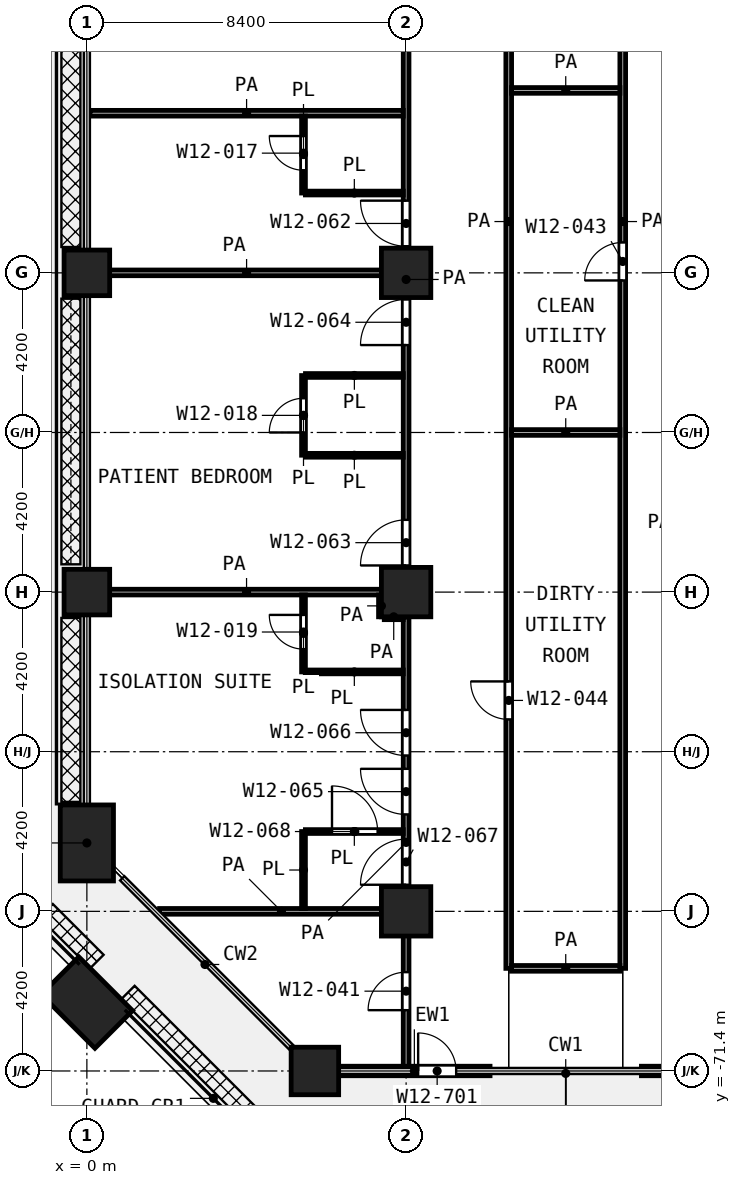
"""IFC4 building model, lengths in metres.
Left out: names, types, materials, properties, quantities, classifications, styles, units other than length and angle.
Written with IfcOpenShell. Run it as: python <this file> out.ifc"""

import sys

from ifc_helpers import new_model, si_unit, direction, frame, frame_2d, origin, origin_2d, place, context, subcontext, project, spatial, rectangle, extrude, element, fill, save


model = new_model("IFC4")
c1 = context("Model", 3, precision=1e-05, world=origin(), true_north=direction((0.0, 1.0)))
c2 = subcontext(c1, "Body", "Model", "MODEL_VIEW")
j1 = project(units=[si_unit("LENGTHUNIT", "METRE"), si_unit("PLANEANGLEUNIT", "RADIAN")], contexts=[c1])
p1 = place(None, origin())
s1 = spatial("IfcSite", under=j1, at=p1, CompositionType="ELEMENT")
p2 = place(p1, origin())
s2 = spatial("IfcBuilding", under=s1, at=p2, CompositionType="ELEMENT")
p3 = place(p2, frame((0.0, 0.0, 56.0)))
s3 = spatial("IfcBuildingStorey", under=s2, at=p3, CompositionType="ELEMENT", Elevation=56.0)
p4 = place(p3, frame((0.0, -50.4, 0.0), z_axis=(0.0, 0.0, 1.0), x_axis=(1.0, 0.0, 0.0)))
e1 = element("IfcColumn", 1, at=p4, inside=s3, PredefinedType="COLUMN", context=c2, shape_type="SweptSolid", body=[
    extrude(rectangle(XDim=1.2, YDim=1.2, at=origin_2d()), origin(), (0.0, 0.0, 1.0), 4.2),
])
p5 = place(p3, frame((8.4, -50.4, 0.0), z_axis=(0.0, 0.0, 1.0), x_axis=(1.0, 0.0, 0.0)))
e2 = element("IfcColumn", 2, at=p5, inside=s3, PredefinedType="COLUMN", context=c2, shape_type="SweptSolid", body=[
    extrude(rectangle(XDim=1.3, YDim=1.3, at=origin_2d()), origin(), (0.0, 0.0, 1.0), 4.2),
])
p6 = place(p3, frame((0.0, -58.8, 0.0), z_axis=(0.0, 0.0, 1.0), x_axis=(1.0, 0.0, 0.0)))
e3 = element("IfcColumn", 3, at=p6, inside=s3, PredefinedType="COLUMN", context=c2, shape_type="SweptSolid", body=[
    extrude(rectangle(XDim=1.2, YDim=1.2, at=origin_2d()), origin(), (0.0, 0.0, 1.0), 4.2),
])
p7 = place(p3, frame((8.4, -58.8, 0.0), z_axis=(0.0, 0.0, 1.0), x_axis=(1.0, 0.0, 0.0)))
e4 = element("IfcColumn", 4, at=p7, inside=s3, PredefinedType="COLUMN", context=c2, shape_type="SweptSolid", body=[
    extrude(rectangle(XDim=1.3, YDim=1.3, at=origin_2d()), origin(), (0.0, 0.0, 1.0), 4.2),
])
p8 = place(p3, frame((0.0, -65.4, 0.0), z_axis=(0.0, 0.0, 1.0), x_axis=(0.0, 1.0, 0.0)))
e5 = element("IfcColumn", 5, at=p8, inside=s3, PredefinedType="COLUMN", context=c2, shape_type="SweptSolid", body=[
    extrude(rectangle(XDim=2.0, YDim=1.4, at=origin_2d()), origin(), (0.0, 0.0, 1.0), 4.2),
])
p9 = place(p3, frame((8.4, -67.2, 0.0), z_axis=(0.0, 0.0, 1.0), x_axis=(1.0, 0.0, 0.0)))
e6 = element("IfcColumn", 6, at=p9, inside=s3, PredefinedType="COLUMN", context=c2, shape_type="SweptSolid", body=[
    extrude(rectangle(XDim=1.3, YDim=1.3, at=origin_2d()), origin(), (0.0, 0.0, 1.0), 4.2),
])
p10 = place(p3, frame((6.0, -71.4, 0.0), z_axis=(0.0, 0.0, 1.0), x_axis=(1.0, 0.0, 0.0)))
e7 = element("IfcColumn", 7, at=p10, inside=s3, PredefinedType="COLUMN", context=c2, shape_type="SweptSolid", body=[
    extrude(rectangle(XDim=1.25, YDim=1.25, at=origin_2d()), origin(), (0.0, 0.0, 1.0), 4.2),
])
p11 = place(p3, frame((0.0, -69.6, 0.0), z_axis=(0.0, 0.0, 1.0), x_axis=(-0.707106781187, 0.707106781187, 0.0)))
e8 = element("IfcColumn", 8, at=p11, inside=s3, PredefinedType="COLUMN", context=c2, shape_type="SweptSolid", body=[
    extrude(rectangle(XDim=2.0, YDim=1.4, at=origin_2d()), origin(), (0.0, 0.0, 1.0), 4.2),
])
p12 = place(p3, frame((6.625, -71.4, 0.0), z_axis=(0.0, 0.0, 1.0), x_axis=(1.0, 0.0, 0.0)))
e9 = element("IfcWall", 9, at=p12, inside=s3, PredefinedType="SOLIDWALL", context=c2, shape_type="SweptSolid", body=[
    extrude(rectangle(XDim=3.983, YDim=0.25, at=frame_2d((1.992, 0.0))), origin(), (0.0, 0.0, 1.0), 3.78),
])
p13 = place(p12, frame((2.092, 0.0, 0.0)))
e10 = element("IfcOpeningElement", 10, at=p13, cuts=e9, PredefinedType="OPENING", context=c2, shape_type="SweptSolid", body=[
    extrude(rectangle(XDim=1.0, YDim=2.1, at=frame_2d((0.5, 1.05))), frame((0.0, 0.135, 0.0), z_axis=(0.0, -1.0, 0.0), x_axis=(1.0, 0.0, 0.0)), (0.0, 0.0, 1.0), 0.27),
])
p14 = place(p3, frame((14.592, -71.4, 0.0), z_axis=(0.0, 0.0, 1.0), x_axis=(1.0, 0.0, 0.0)))
e11 = element("IfcWall", 11, at=p14, inside=s3, PredefinedType="SOLIDWALL", context=c2, shape_type="SweptSolid", body=[
    extrude(rectangle(XDim=3.983, YDim=0.25, at=frame_2d((1.992, 0.0))), origin(), (0.0, 0.0, 1.0), 3.78),
])
p15 = place(p14, frame((0.892, 0.0, 0.0)))
e12 = element("IfcOpeningElement", 12, at=p15, cuts=e11, PredefinedType="OPENING", context=c2, shape_type="SweptSolid", body=[
    extrude(rectangle(XDim=1.0, YDim=2.1, at=frame_2d((0.5, 1.05))), frame((0.0, 0.135, 0.0), z_axis=(0.0, -1.0, 0.0), x_axis=(1.0, 0.0, 0.0)), (0.0, 0.0, 1.0), 0.27),
])
p16 = place(p3, frame((5.75, -65.1, 0.0), z_axis=(0.0, 0.0, 1.0), x_axis=(1.0, 0.0, 0.0)))
e13 = element("IfcWall", 13, at=p16, inside=s3, PredefinedType="PARTITIONING", context=c2, shape_type="SweptSolid", body=[
    extrude(rectangle(XDim=2.575, YDim=0.1, at=frame_2d((1.288, 0.0))), origin(), (0.0, 0.0, 1.0), 3.9),
])
p17 = place(p16, frame((0.7, 0.0, 0.0)))
e14 = element("IfcOpeningElement", 14, at=p17, cuts=e13, PredefinedType="OPENING", context=c2, shape_type="SweptSolid", body=[
    extrude(rectangle(XDim=1.2, YDim=2.1, at=frame_2d((0.6, 1.05))), frame((0.0, 0.06, 0.0), z_axis=(0.0, -1.0, 0.0), x_axis=(1.0, 0.0, 0.0)), (0.0, 0.0, 1.0), 0.12),
])
p18 = place(p3, frame((5.75, -60.9, 0.0), z_axis=(0.0, 0.0, 1.0), x_axis=(1.0, 0.0, 0.0)))
e15 = element("IfcWall", 15, at=p18, inside=s3, PredefinedType="PARTITIONING", context=c2, shape_type="SweptSolid", body=[
    extrude(rectangle(XDim=2.575, YDim=0.1, at=frame_2d((1.288, 0.0))), origin(), (0.0, 0.0, 1.0), 3.9),
])
p19 = place(p3, frame((5.751, -55.2, 0.0), z_axis=(0.0, 0.0, 1.0), x_axis=(1.0, 0.0, 0.0)))
e16 = element("IfcWall", 16, at=p19, inside=s3, PredefinedType="PARTITIONING", context=c2, shape_type="SweptSolid", body=[
    extrude(rectangle(XDim=2.574, YDim=0.1, at=frame_2d((1.287, 0.0))), origin(), (0.0, 0.0, 1.0), 3.9),
])
p20 = place(p3, frame((5.752, -53.1, 0.0), z_axis=(0.0, 0.0, 1.0), x_axis=(1.0, 0.0, 0.0)))
e17 = element("IfcWall", 17, at=p20, inside=s3, PredefinedType="PARTITIONING", context=c2, shape_type="SweptSolid", body=[
    extrude(rectangle(XDim=2.573, YDim=0.1, at=frame_2d((1.287, 0.0))), origin(), (0.0, 0.0, 1.0), 3.9),
])
p21 = place(p3, frame((5.75, -48.3, 0.0), z_axis=(0.0, 0.0, 1.0), x_axis=(1.0, 0.0, 0.0)))
e18 = element("IfcWall", 18, at=p21, inside=s3, PredefinedType="PARTITIONING", context=c2, shape_type="SweptSolid", body=[
    extrude(rectangle(XDim=2.575, YDim=0.1, at=frame_2d((1.288, 0.0))), origin(), (0.0, 0.0, 1.0), 3.9),
])
p22 = place(p3, frame((5.7, -67.125, 0.0), z_axis=(0.0, 0.0, 1.0), x_axis=(0.0, 1.0, 0.0)))
e19 = element("IfcWall", 19, at=p22, inside=s3, PredefinedType="PARTITIONING", context=c2, shape_type="SweptSolid", body=[
    extrude(rectangle(XDim=2.025, YDim=0.1, at=frame_2d((1.012, 0.0))), origin(), (0.0, 0.0, 1.0), 3.9),
])
p23 = place(p3, frame((5.7, -60.9, 0.0), z_axis=(0.0, 0.0, 1.0), x_axis=(0.0, 1.0, 0.0)))
e20 = element("IfcWall", 20, at=p23, inside=s3, PredefinedType="PARTITIONING", context=c2, shape_type="SweptSolid", body=[
    extrude(rectangle(XDim=2.025, YDim=0.1, at=frame_2d((1.012, 0.0))), origin(), (0.0, 0.0, 1.0), 3.9),
])
p24 = place(p23, frame((0.6, 0.0, 0.0)))
e21 = element("IfcOpeningElement", 21, at=p24, cuts=e20, PredefinedType="OPENING", context=c2, shape_type="SweptSolid", body=[
    extrude(rectangle(XDim=0.9, YDim=2.1, at=frame_2d((0.45, 1.05))), frame((0.0, 0.06, 0.0), z_axis=(0.0, -1.0, 0.0), x_axis=(1.0, 0.0, 0.0)), (0.0, 0.0, 1.0), 0.12),
])
p25 = place(p3, frame((5.7, -55.198, 0.0), z_axis=(0.0, 0.0, 1.0), x_axis=(0.0, 1.0, 0.0)))
e22 = element("IfcWall", 22, at=p25, inside=s3, PredefinedType="PARTITIONING", context=c2, shape_type="SweptSolid", body=[
    extrude(rectangle(XDim=2.096, YDim=0.1, at=frame_2d((1.048, 0.0))), origin(), (0.0, 0.0, 1.0), 3.9),
])
p26 = place(p25, frame((0.598, 0.0, 0.0)))
e23 = element("IfcOpeningElement", 23, at=p26, cuts=e22, PredefinedType="OPENING", context=c2, shape_type="SweptSolid", body=[
    extrude(rectangle(XDim=0.9, YDim=2.1, at=frame_2d((0.45, 1.05))), frame((0.0, 0.06, 0.0), z_axis=(0.0, -1.0, 0.0), x_axis=(1.0, 0.0, 0.0)), (0.0, 0.0, 1.0), 0.12),
])
p27 = place(p3, frame((5.7, -48.3, 0.0), z_axis=(0.0, 0.0, 1.0), x_axis=(0.0, 1.0, 0.0)))
e24 = element("IfcWall", 24, at=p27, inside=s3, PredefinedType="PARTITIONING", context=c2, shape_type="SweptSolid", body=[
    extrude(rectangle(XDim=2.025, YDim=0.1, at=frame_2d((1.013, 0.0))), origin(), (0.0, 0.0, 1.0), 3.9),
])
p28 = place(p27, frame((0.6, 0.0, 0.0)))
e25 = element("IfcOpeningElement", 25, at=p28, cuts=e24, PredefinedType="OPENING", context=c2, shape_type="SweptSolid", body=[
    extrude(rectangle(XDim=0.9, YDim=2.1, at=frame_2d((0.45, 1.05))), frame((0.0, 0.06, 0.0), z_axis=(0.0, -1.0, 0.0), x_axis=(1.0, 0.0, 0.0)), (0.0, 0.0, 1.0), 0.12),
])
p29 = place(p3, frame((11.175, -68.7, 0.0), z_axis=(0.0, 0.0, 1.0), x_axis=(1.0, 0.0, 0.0)))
e26 = element("IfcWall", 26, at=p29, inside=s3, PredefinedType="PARTITIONING", context=c2, shape_type="SweptSolid", body=[
    extrude(rectangle(XDim=2.85, YDim=0.15, at=frame_2d((1.425, 0.0))), origin(), (0.0, 0.0, 1.0), 3.9),
])
p30 = place(p3, frame((1.913, -67.2, 0.0), z_axis=(0.0, 0.0, 1.0), x_axis=(1.0, 0.0, 0.0)))
e27 = element("IfcWall", 27, at=p30, inside=s3, PredefinedType="PARTITIONING", context=c2, shape_type="SweptSolid", body=[
    extrude(rectangle(XDim=6.412, YDim=0.15, at=frame_2d((3.206, 0.0))), origin(), (0.0, 0.0, 1.0), 3.9),
])
p31 = place(p3, frame((7.825, -59.45, 0.0), z_axis=(0.0, 0.0, 1.0), x_axis=(1.0, 0.0, 0.0)))
e28 = element("IfcWall", 28, at=p31, inside=s3, PredefinedType="PARTITIONING", context=c2, shape_type="SweptSolid", body=[
    extrude(rectangle(XDim=0.498, YDim=0.15, at=frame_2d((0.249, 0.0))), origin(), (0.0, 0.0, 1.0), 3.9),
])
p32 = place(p3, frame((0.08, -58.8, 0.0), z_axis=(0.0, 0.0, 1.0), x_axis=(1.0, 0.0, 0.0)))
e29 = element("IfcWall", 29, at=p32, inside=s3, PredefinedType="PARTITIONING", context=c2, shape_type="SweptSolid", body=[
    extrude(rectangle(XDim=8.243, YDim=0.15, at=frame_2d((4.122, 0.0))), origin(), (0.0, 0.0, 1.0), 3.9),
])
p33 = place(p3, frame((11.175, -54.6, 0.0), z_axis=(0.0, 0.0, 1.0), x_axis=(1.0, 0.0, 0.0)))
e30 = element("IfcWall", 30, at=p33, inside=s3, PredefinedType="PARTITIONING", context=c2, shape_type="SweptSolid", body=[
    extrude(rectangle(XDim=2.85, YDim=0.15, at=frame_2d((1.425, 0.0))), origin(), (0.0, 0.0, 1.0), 3.9),
])
for number, where, z_axis, x_axis in (
    (31, (0.08, -50.4, 0.0), (0.0, 0.0, 1.0), (1.0, 0.0, 0.0)),
    (32, (0.08, -46.2, 0.0), (0.0, 0.0, 1.0), (1.0, 0.0, 0.0)),
):
    element("IfcWall", number, at=place(p3, frame(where, z_axis=z_axis, x_axis=x_axis)), inside=s3, PredefinedType="PARTITIONING", context=c2, shape_type="SweptSolid", body=[
        extrude(rectangle(XDim=8.245, YDim=0.15, at=frame_2d((4.123, 0.0))), origin(), (0.0, 0.0, 1.0), 3.9),
    ])
p34 = place(p3, frame((11.175, -45.6, 0.0), z_axis=(0.0, 0.0, 1.0), x_axis=(1.0, 0.0, 0.0)))
e33 = element("IfcWall", 33, at=p34, inside=s3, PredefinedType="PARTITIONING", context=c2, shape_type="SweptSolid", body=[
    extrude(rectangle(XDim=2.85, YDim=0.15, at=frame_2d((1.425, 0.0))), origin(), (0.0, 0.0, 1.0), 3.9),
])
p35 = place(p3, frame((7.75, -59.45, 0.0), z_axis=(0.0, 0.0, 1.0), x_axis=(0.0, 1.0, 0.0)))
e34 = element("IfcWall", 34, at=p35, inside=s3, PredefinedType="PARTITIONING", context=c2, shape_type="SweptSolid", body=[
    extrude(rectangle(XDim=0.575, YDim=0.15, at=frame_2d((0.288, 0.0))), origin(), (0.0, 0.0, 1.0), 3.9),
])
p36 = place(p3, frame((8.4, -71.32, 0.0), z_axis=(0.0, 0.0, 1.0), x_axis=(0.0, 1.0, 0.0)))
e35 = element("IfcWall", 35, at=p36, inside=s3, PredefinedType="PARTITIONING", context=c2, shape_type="SweptSolid", body=[
    extrude(rectangle(XDim=11.868, YDim=0.15, at=frame_2d((5.934, 0.0))), origin(), (0.0, 0.0, 1.0), 3.9),
])
p37 = place(p36, frame((6.67, 0.0, 0.0)))
e36 = element("IfcOpeningElement", 36, at=p37, cuts=e35, PredefinedType="OPENING", context=c2, shape_type="SweptSolid", body=[
    extrude(rectangle(XDim=1.2, YDim=2.1, at=frame_2d((0.6, 1.05))), frame((0.0, 0.085, 0.0), z_axis=(0.0, -1.0, 0.0), x_axis=(1.0, 0.0, 0.0)), (0.0, 0.0, 1.0), 0.17),
])
p38 = place(p36, frame((8.22, 0.0, 0.0)))
e37 = element("IfcOpeningElement", 37, at=p38, cuts=e35, PredefinedType="OPENING", context=c2, shape_type="SweptSolid", body=[
    extrude(rectangle(XDim=1.2, YDim=2.1, at=frame_2d((0.6, 1.05))), frame((0.0, 0.085, 0.0), z_axis=(0.0, -1.0, 0.0), x_axis=(1.0, 0.0, 0.0)), (0.0, 0.0, 1.0), 0.17),
])
p39 = place(p36, frame((4.82, 0.0, 0.0)))
e38 = element("IfcOpeningElement", 38, at=p39, cuts=e35, PredefinedType="OPENING", context=c2, shape_type="SweptSolid", body=[
    extrude(rectangle(XDim=1.2, YDim=2.1, at=frame_2d((0.6, 1.05))), frame((0.0, 0.085, 0.0), z_axis=(0.0, -1.0, 0.0), x_axis=(1.0, 0.0, 0.0)), (0.0, 0.0, 1.0), 0.17),
])
p40 = place(p36, frame((1.52, 0.0, 0.0)))
e39 = element("IfcOpeningElement", 39, at=p40, cuts=e35, PredefinedType="OPENING", context=c2, shape_type="SweptSolid", body=[
    extrude(rectangle(XDim=1.0, YDim=2.1, at=frame_2d((0.5, 1.05))), frame((0.0, 0.085, 0.0), z_axis=(0.0, -1.0, 0.0), x_axis=(1.0, 0.0, 0.0)), (0.0, 0.0, 1.0), 0.17),
])
p41 = place(p3, frame((8.4, -58.798, 0.0), z_axis=(0.0, 0.0, 1.0), x_axis=(0.0, 1.0, 0.0)))
e40 = element("IfcWall", 40, at=p41, inside=s3, PredefinedType="PARTITIONING", context=c2, shape_type="SweptSolid", body=[
    extrude(rectangle(XDim=16.448, YDim=0.15, at=frame_2d((8.224, 0.0))), origin(), (0.0, 0.0, 1.0), 3.9),
])
p42 = place(p41, frame((9.098, 0.0, 0.0)))
e41 = element("IfcOpeningElement", 41, at=p42, cuts=e40, PredefinedType="OPENING", context=c2, shape_type="SweptSolid", body=[
    extrude(rectangle(XDim=1.2, YDim=2.1, at=frame_2d((0.6, 1.05))), frame((0.0, 0.085, 0.0), z_axis=(0.0, -1.0, 0.0), x_axis=(1.0, 0.0, 0.0)), (0.0, 0.0, 1.0), 0.17),
])
p43 = place(p41, frame((0.699, 0.0, 0.0)))
e42 = element("IfcOpeningElement", 42, at=p43, cuts=e40, PredefinedType="OPENING", context=c2, shape_type="SweptSolid", body=[
    extrude(rectangle(XDim=1.2, YDim=2.1, at=frame_2d((0.6, 1.05))), frame((0.0, 0.085, 0.0), z_axis=(0.0, -1.0, 0.0), x_axis=(1.0, 0.0, 0.0)), (0.0, 0.0, 1.0), 0.17),
])
p44 = place(p41, frame((6.498, 0.0, 0.0)))
e43 = element("IfcOpeningElement", 43, at=p44, cuts=e40, PredefinedType="OPENING", context=c2, shape_type="SweptSolid", body=[
    extrude(rectangle(XDim=1.2, YDim=2.1, at=frame_2d((0.6, 1.05))), frame((0.0, 0.085, 0.0), z_axis=(0.0, -1.0, 0.0), x_axis=(1.0, 0.0, 0.0)), (0.0, 0.0, 1.0), 0.17),
])
p45 = place(p3, frame((11.1, -68.7, 0.0), z_axis=(0.0, 0.0, 1.0), x_axis=(0.0, 1.0, 0.0)))
e44 = element("IfcWall", 44, at=p45, inside=s3, PredefinedType="PARTITIONING", context=c2, shape_type="SweptSolid", body=[
    extrude(rectangle(XDim=39.3, YDim=0.15, at=frame_2d((19.65, 0.0))), origin(), (0.0, 0.0, 1.0), 3.9),
])
p46 = place(p45, frame((34.35, 0.0, 0.0)))
e45 = element("IfcOpeningElement", 45, at=p46, cuts=e44, PredefinedType="OPENING", context=c2, shape_type="SweptSolid", body=[
    extrude(rectangle(XDim=1.2, YDim=2.1, at=frame_2d((0.6, 1.05))), frame((0.0, 0.085, 0.0), z_axis=(0.0, -1.0, 0.0), x_axis=(1.0, 0.0, 0.0)), (0.0, 0.0, 1.0), 0.17),
])
p47 = place(p45, frame((26.35, 0.0, 0.0)))
e46 = element("IfcOpeningElement", 46, at=p47, cuts=e44, PredefinedType="OPENING", context=c2, shape_type="SweptSolid", body=[
    extrude(rectangle(XDim=1.0, YDim=2.1, at=frame_2d((0.5, 1.05))), frame((0.0, 0.085, 0.0), z_axis=(0.0, -1.0, 0.0), x_axis=(1.0, 0.0, 0.0)), (0.0, 0.0, 1.0), 0.17),
])
p48 = place(p45, frame((6.55, 0.0, 0.0)))
e47 = element("IfcOpeningElement", 47, at=p48, cuts=e44, PredefinedType="OPENING", context=c2, shape_type="SweptSolid", body=[
    extrude(rectangle(XDim=1.0, YDim=2.1, at=frame_2d((0.5, 1.05))), frame((0.0, 0.085, 0.0), z_axis=(0.0, -1.0, 0.0), x_axis=(1.0, 0.0, 0.0)), (0.0, 0.0, 1.0), 0.17),
])
p49 = place(p3, frame((14.1, -68.7, 0.0), z_axis=(0.0, 0.0, 1.0), x_axis=(0.0, 1.0, 0.0)))
e48 = element("IfcWall", 48, at=p49, inside=s3, PredefinedType="PARTITIONING", context=c2, shape_type="SweptSolid", body=[
    extrude(rectangle(XDim=39.3, YDim=0.15, at=frame_2d((19.65, 0.0))), origin(), (0.0, 0.0, 1.0), 3.9),
])
p50 = place(p49, frame((18.1, 0.0, 0.0)))
e49 = element("IfcOpeningElement", 49, at=p50, cuts=e48, PredefinedType="OPENING", context=c2, shape_type="SweptSolid", body=[
    extrude(rectangle(XDim=1.0, YDim=2.1, at=frame_2d((0.5, 1.05))), frame((0.0, 0.085, 0.0), z_axis=(0.0, -1.0, 0.0), x_axis=(1.0, 0.0, 0.0)), (0.0, 0.0, 1.0), 0.17),
])
p51 = place(p13, origin())
e50 = element("IfcDoor", 50, at=p51, inside=s3, OperationType="SINGLE_SWING_LEFT", PredefinedType="DOOR", context=c2, shape_type="SweptSolid", body=[
    extrude(rectangle(XDim=1.0, YDim=2.1, at=frame_2d((0.5, 1.05))), frame((0.0, 0.025, 0.0), z_axis=(0.0, -1.0, 0.0), x_axis=(1.0, 0.0, 0.0)), (0.0, 0.0, 1.0), 0.05),
])
fill(e10, e50)
p52 = place(p42, origin())
e51 = element("IfcDoor", 51, at=p52, inside=s3, OperationType="SINGLE_SWING_RIGHT", PredefinedType="DOOR", context=c2, shape_type="SweptSolid", body=[
    extrude(rectangle(XDim=1.2, YDim=2.1, at=frame_2d((0.6, 1.05))), frame((0.0, 0.025, 0.0), z_axis=(0.0, -1.0, 0.0), x_axis=(1.0, 0.0, 0.0)), (0.0, 0.0, 1.0), 0.05),
])
fill(e41, e51)
p53 = place(p28, origin())
e52 = element("IfcDoor", 52, at=p53, inside=s3, OperationType="SINGLE_SWING_RIGHT", PredefinedType="DOOR", context=c2, shape_type="SweptSolid", body=[
    extrude(rectangle(XDim=0.9, YDim=2.1, at=frame_2d((0.45, 1.05))), frame((0.0, 0.025, 0.0), z_axis=(0.0, -1.0, 0.0), x_axis=(1.0, 0.0, 0.0)), (0.0, 0.0, 1.0), 0.05),
])
fill(e25, e52)
p54 = place(p43, origin())
e53 = element("IfcDoor", 53, at=p54, inside=s3, OperationType="SINGLE_SWING_LEFT", PredefinedType="DOOR", context=c2, shape_type="SweptSolid", body=[
    extrude(rectangle(XDim=1.2, YDim=2.1, at=frame_2d((0.6, 1.05))), frame((0.0, 0.025, 0.0), z_axis=(0.0, -1.0, 0.0), x_axis=(1.0, 0.0, 0.0)), (0.0, 0.0, 1.0), 0.05),
])
fill(e42, e53)
p55 = place(p44, origin())
e54 = element("IfcDoor", 54, at=p55, inside=s3, OperationType="SINGLE_SWING_LEFT", PredefinedType="DOOR", context=c2, shape_type="SweptSolid", body=[
    extrude(rectangle(XDim=1.2, YDim=2.1, at=frame_2d((0.6, 1.05))), frame((0.0, 0.025, 0.0), z_axis=(0.0, -1.0, 0.0), x_axis=(1.0, 0.0, 0.0)), (0.0, 0.0, 1.0), 0.05),
])
fill(e43, e54)
p56 = place(p26, origin())
e55 = element("IfcDoor", 55, at=p56, inside=s3, OperationType="SINGLE_SWING_LEFT", PredefinedType="DOOR", context=c2, shape_type="SweptSolid", body=[
    extrude(rectangle(XDim=0.9, YDim=2.1, at=frame_2d((0.45, 1.05))), frame((0.0, 0.025, 0.0), z_axis=(0.0, -1.0, 0.0), x_axis=(1.0, 0.0, 0.0)), (0.0, 0.0, 1.0), 0.05),
])
fill(e23, e55)
p57 = place(p37, origin())
e56 = element("IfcDoor", 56, at=p57, inside=s3, OperationType="SINGLE_SWING_RIGHT", PredefinedType="DOOR", context=c2, shape_type="SweptSolid", body=[
    extrude(rectangle(XDim=1.2, YDim=2.1, at=frame_2d((0.6, 1.05))), frame((0.0, 0.025, 0.0), z_axis=(0.0, -1.0, 0.0), x_axis=(1.0, 0.0, 0.0)), (0.0, 0.0, 1.0), 0.05),
])
fill(e36, e56)
p58 = place(p38, origin())
e57 = element("IfcDoor", 57, at=p58, inside=s3, OperationType="SINGLE_SWING_RIGHT", PredefinedType="DOOR", context=c2, shape_type="SweptSolid", body=[
    extrude(rectangle(XDim=1.2, YDim=2.1, at=frame_2d((0.6, 1.05))), frame((0.0, 0.025, 0.0), z_axis=(0.0, -1.0, 0.0), x_axis=(1.0, 0.0, 0.0)), (0.0, 0.0, 1.0), 0.05),
])
fill(e37, e57)
p59 = place(p39, origin())
e58 = element("IfcDoor", 58, at=p59, inside=s3, OperationType="SINGLE_SWING_LEFT", PredefinedType="DOOR", context=c2, shape_type="SweptSolid", body=[
    extrude(rectangle(XDim=1.2, YDim=2.1, at=frame_2d((0.6, 1.05))), frame((0.0, 0.025, 0.0), z_axis=(0.0, -1.0, 0.0), x_axis=(1.0, 0.0, 0.0)), (0.0, 0.0, 1.0), 0.05),
])
fill(e38, e58)
p60 = place(p17, origin())
e59 = element("IfcDoor", 59, at=p60, inside=s3, OperationType="SINGLE_SWING_LEFT", PredefinedType="DOOR", context=c2, shape_type="SweptSolid", body=[
    extrude(rectangle(XDim=1.2, YDim=2.1, at=frame_2d((0.6, 1.05))), frame((0.0, 0.025, 0.0), z_axis=(0.0, -1.0, 0.0), x_axis=(1.0, 0.0, 0.0)), (0.0, 0.0, 1.0), 0.05),
])
fill(e14, e59)
p61 = place(p24, origin())
e60 = element("IfcDoor", 60, at=p61, inside=s3, OperationType="SINGLE_SWING_RIGHT", PredefinedType="DOOR", context=c2, shape_type="SweptSolid", body=[
    extrude(rectangle(XDim=0.9, YDim=2.1, at=frame_2d((0.45, 1.05))), frame((0.0, 0.025, 0.0), z_axis=(0.0, -1.0, 0.0), x_axis=(1.0, 0.0, 0.0)), (0.0, 0.0, 1.0), 0.05),
])
fill(e21, e60)
p62 = place(p40, origin())
e61 = element("IfcDoor", 61, at=p62, inside=s3, OperationType="SINGLE_SWING_LEFT", PredefinedType="DOOR", context=c2, shape_type="SweptSolid", body=[
    extrude(rectangle(XDim=1.0, YDim=2.1, at=frame_2d((0.5, 1.05))), frame((0.0, 0.025, 0.0), z_axis=(0.0, -1.0, 0.0), x_axis=(1.0, 0.0, 0.0)), (0.0, 0.0, 1.0), 0.05),
])
fill(e39, e61)
p63 = place(p50, origin())
e62 = element("IfcDoor", 62, at=p63, inside=s3, OperationType="SINGLE_SWING_LEFT", PredefinedType="DOOR", context=c2, shape_type="SweptSolid", body=[
    extrude(rectangle(XDim=1.0, YDim=2.1, at=frame_2d((0.5, 1.05))), frame((0.0, 0.025, 0.0), z_axis=(0.0, -1.0, 0.0), x_axis=(1.0, 0.0, 0.0)), (0.0, 0.0, 1.0), 0.05),
])
fill(e49, e62)
p64 = place(p48, origin())
e63 = element("IfcDoor", 63, at=p64, inside=s3, OperationType="SINGLE_SWING_RIGHT", PredefinedType="DOOR", context=c2, shape_type="SweptSolid", body=[
    extrude(rectangle(XDim=1.0, YDim=2.1, at=frame_2d((0.5, 1.05))), frame((0.0, 0.025, 0.0), z_axis=(0.0, -1.0, 0.0), x_axis=(1.0, 0.0, 0.0)), (0.0, 0.0, 1.0), 0.05),
])
fill(e47, e63)
save(model, sys.argv[1])
